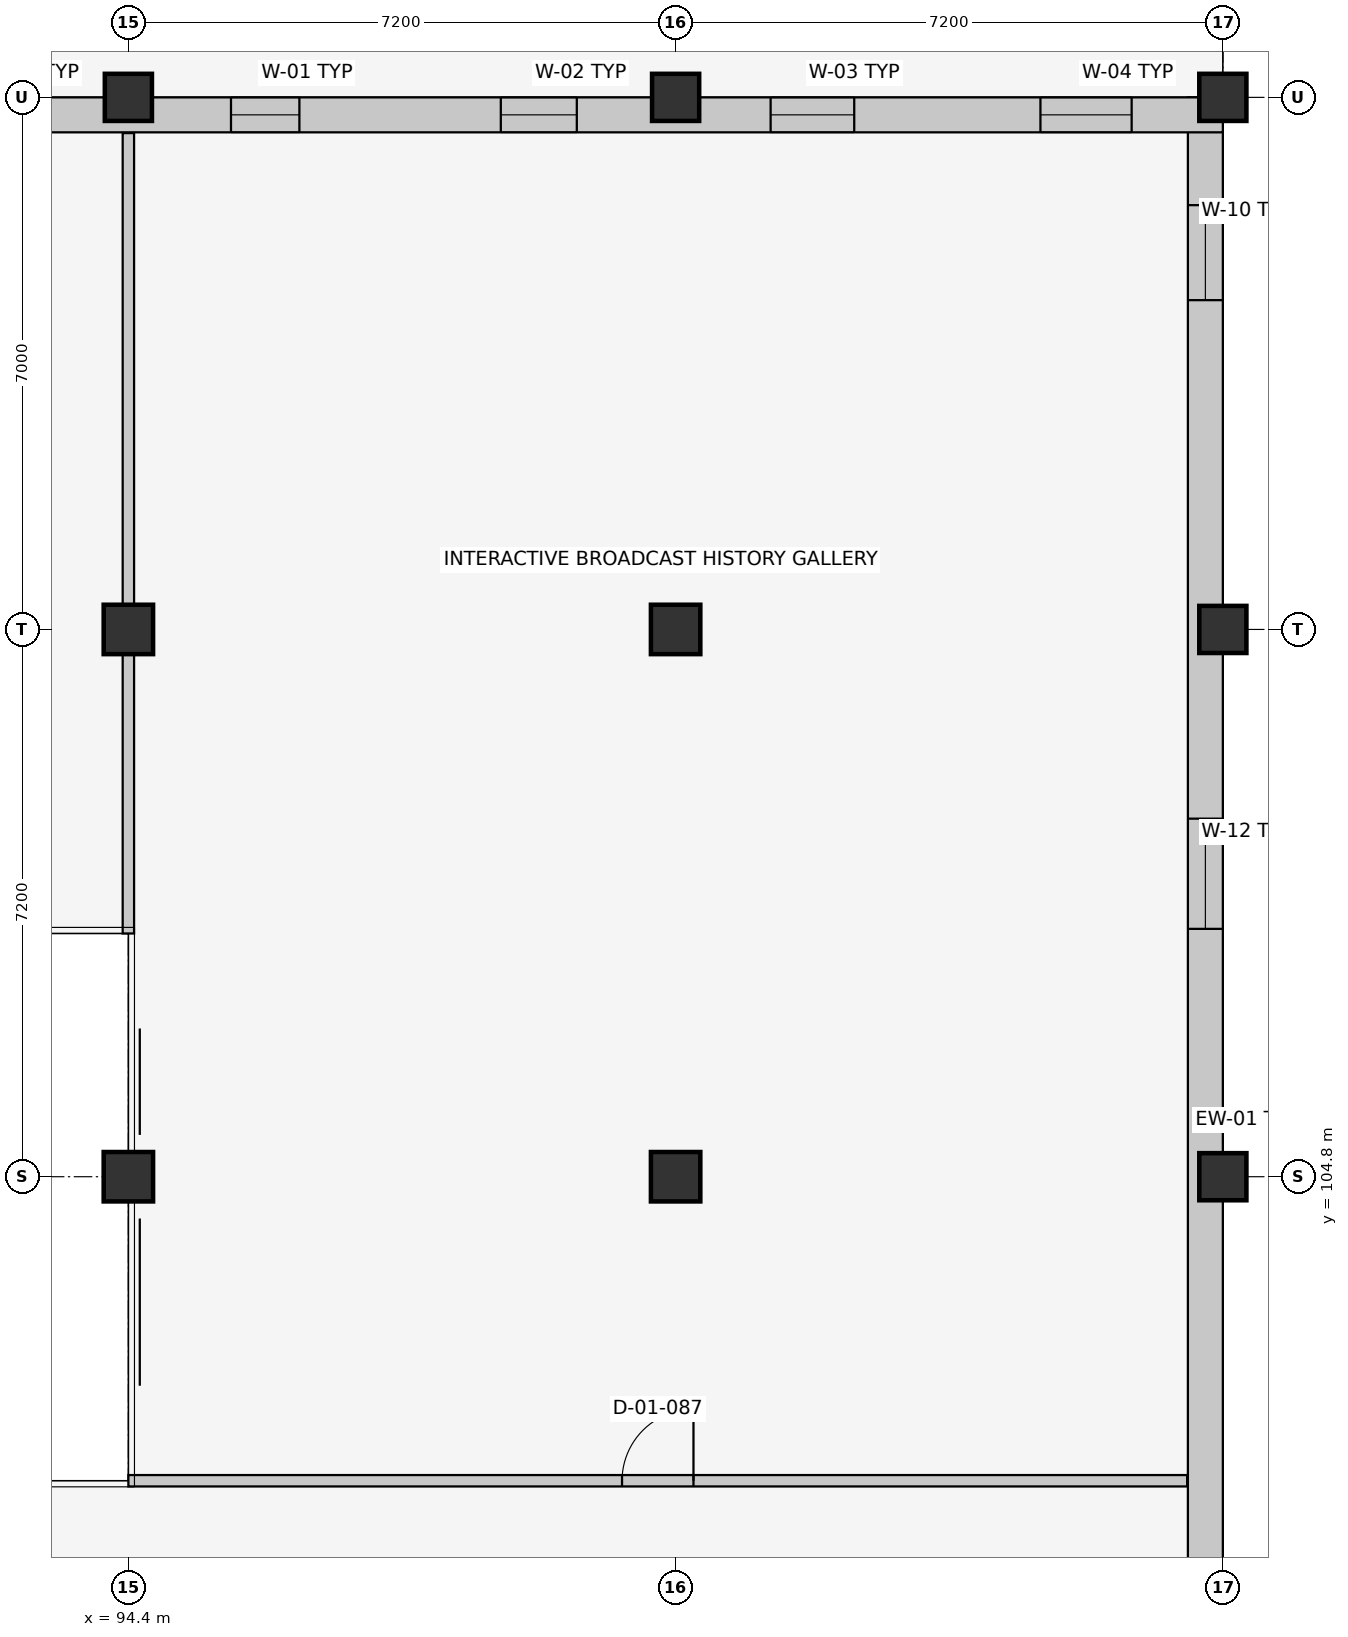
"""IFC4 building model, lengths in metres.
Left out: names, types, materials, properties, quantities, classifications, styles, units other than length and angle.
Written with IfcOpenShell. Run it as: python <this file> out.ifc"""

import sys

from ifc_helpers import new_model, si_unit, direction, frame, frame_2d, origin, origin_2d, place, context, subcontext, project, spatial, rectangle, extrude, element, fill, save


model = new_model("IFC4")
c1 = context("Model", 3, precision=1e-05, world=origin(), true_north=direction((0.0, 1.0)))
c2 = subcontext(c1, "Body", "Model", "MODEL_VIEW")
j1 = project(units=[si_unit("LENGTHUNIT", "METRE"), si_unit("PLANEANGLEUNIT", "RADIAN")], contexts=[c1])
p1 = place(None, origin())
s1 = spatial("IfcSite", under=j1, at=p1, CompositionType="ELEMENT")
p2 = place(p1, origin())
s2 = spatial("IfcBuilding", under=s1, at=p2, CompositionType="ELEMENT")
p3 = place(p2, frame((0.0, 0.0, 5.4)))
s3 = spatial("IfcBuildingStorey", under=s2, at=p3, CompositionType="ELEMENT", Elevation=5.4)
for number, where, z_axis, x_axis in (
    (1, (94.4, 104.8, 0.0), (0.0, 0.0, 1.0), (1.0, 0.0, 0.0)),
    (2, (94.4, 112.0, 0.0), (0.0, 0.0, 1.0), (1.0, 0.0, 0.0)),
):
    element("IfcColumn", number, at=place(p3, frame(where, z_axis=z_axis, x_axis=x_axis)), inside=s3, PredefinedType="COLUMN", context=c2, shape_type="SweptSolid", body=[
        extrude(rectangle(XDim=0.65, YDim=0.65, at=origin_2d()), origin(), (0.0, 0.0, 1.0), 4.2),
    ])
p4 = place(p3, frame((94.4, 119.0, 0.0), z_axis=(0.0, 0.0, 1.0), x_axis=(1.0, 0.0, 0.0)))
e3 = element("IfcColumn", 3, at=p4, inside=s3, PredefinedType="COLUMN", context=c2, shape_type="SweptSolid", body=[
    extrude(rectangle(XDim=0.62, YDim=0.62, at=origin_2d()), origin(), (0.0, 0.0, 1.0), 4.2),
])
for number, where, z_axis, x_axis in (
    (4, (101.6, 104.8, 0.0), (0.0, 0.0, 1.0), (1.0, 0.0, 0.0)),
    (5, (101.6, 112.0, 0.0), (0.0, 0.0, 1.0), (1.0, 0.0, 0.0)),
):
    element("IfcColumn", number, at=place(p3, frame(where, z_axis=z_axis, x_axis=x_axis)), inside=s3, PredefinedType="COLUMN", context=c2, shape_type="SweptSolid", body=[
        extrude(rectangle(XDim=0.65, YDim=0.65, at=origin_2d()), origin(), (0.0, 0.0, 1.0), 4.2),
    ])
for number, where, z_axis, x_axis in (
    (6, (101.6, 119.0, 0.0), (0.0, 0.0, 1.0), (1.0, 0.0, 0.0)),
    (7, (108.8, 104.8, 0.0), (0.0, 0.0, 1.0), (1.0, 0.0, 0.0)),
    (8, (108.8, 112.0, 0.0), (0.0, 0.0, 1.0), (1.0, 0.0, 0.0)),
    (9, (108.8, 119.0, 0.0), (0.0, 0.0, 1.0), (1.0, 0.0, 0.0)),
):
    element("IfcColumn", number, at=place(p3, frame(where, z_axis=z_axis, x_axis=x_axis)), inside=s3, PredefinedType="COLUMN", context=c2, shape_type="SweptSolid", body=[
        extrude(rectangle(XDim=0.62, YDim=0.62, at=origin_2d()), origin(), (0.0, 0.0, 1.0), 4.2),
    ])
p5 = place(p3, frame((108.57, 119.0, 0.0), z_axis=(0.0, 0.0, 1.0), x_axis=(0.0, -1.0, 0.0)))
e10 = element("IfcWall", 10, at=p5, inside=s3, PredefinedType="SOLIDWALL", context=c2, shape_type="SweptSolid", body=[
    extrude(rectangle(XDim=28.6, YDim=0.46, at=frame_2d((14.3, 0.0))), origin(), (0.0, 0.0, 1.0), 3.175),
])
p6 = place(p5, frame((1.418, 0.0, 0.9)))
e11 = element("IfcOpeningElement", 11, at=p6, cuts=e10, PredefinedType="OPENING", context=c2, shape_type="SweptSolid", body=[
    extrude(rectangle(XDim=1.25, YDim=1.45, at=frame_2d((0.625, 0.725))), frame((0.0, 0.242, 0.0), z_axis=(0.0, -1.0, 0.0), x_axis=(1.0, 0.0, 0.0)), (0.0, 0.0, 1.0), 0.484),
])
p7 = place(p5, frame((9.489, 0.0, 0.9)))
e12 = element("IfcOpeningElement", 12, at=p7, cuts=e10, PredefinedType="OPENING", context=c2, shape_type="SweptSolid", body=[
    extrude(rectangle(XDim=1.45, YDim=1.45, at=frame_2d((0.725, 0.725))), frame((0.0, 0.242, 0.0), z_axis=(0.0, -1.0, 0.0), x_axis=(1.0, 0.0, 0.0)), (0.0, 0.0, 1.0), 0.484),
])
p8 = place(p5, frame((25.932, 0.0, 0.9)))
e13 = element("IfcOpeningElement", 13, at=p8, cuts=e10, PredefinedType="OPENING", context=c2, shape_type="SweptSolid", body=[
    extrude(rectangle(XDim=1.25, YDim=1.6, at=frame_2d((0.625, 0.8))), frame((0.0, 0.242, 0.0), z_axis=(0.0, -1.0, 0.0), x_axis=(1.0, 0.0, 0.0)), (0.0, 0.0, 1.0), 0.484),
])
p9 = place(p3, frame((65.6, 118.77, 0.0), z_axis=(0.0, 0.0, 1.0), x_axis=(1.0, 0.0, 0.0)))
e14 = element("IfcWall", 14, at=p9, inside=s3, PredefinedType="SOLIDWALL", context=c2, shape_type="SweptSolid", body=[
    extrude(rectangle(XDim=43.2, YDim=0.46, at=frame_2d((21.6, 0.0))), origin(), (0.0, 0.0, 1.0), 3.215),
])
p10 = place(p9, frame((1.11, 0.0, 0.9)))
e15 = element("IfcOpeningElement", 15, at=p10, cuts=e14, PredefinedType="OPENING", context=c2, shape_type="SweptSolid", body=[
    extrude(rectangle(XDim=1.38, YDim=1.6, at=frame_2d((0.69, 0.8))), frame((0.0, 0.242, 0.0), z_axis=(0.0, -1.0, 0.0), x_axis=(1.0, 0.0, 0.0)), (0.0, 0.0, 1.0), 0.484),
])
p11 = place(p9, frame((4.65, 0.0, 0.9)))
e16 = element("IfcOpeningElement", 16, at=p11, cuts=e14, PredefinedType="OPENING", context=c2, shape_type="SweptSolid", body=[
    extrude(rectangle(XDim=1.5, YDim=1.6, at=frame_2d((0.75, 0.8))), frame((0.0, 0.242, 0.0), z_axis=(0.0, -1.0, 0.0), x_axis=(1.0, 0.0, 0.0)), (0.0, 0.0, 1.0), 0.484),
])
p12 = place(p9, frame((8.5, 0.0, 0.9)))
e17 = element("IfcOpeningElement", 17, at=p12, cuts=e14, PredefinedType="OPENING", context=c2, shape_type="SweptSolid", body=[
    extrude(rectangle(XDim=1.0, YDim=1.75, at=frame_2d((0.5, 0.875))), frame((0.0, 0.242, 0.0), z_axis=(0.0, -1.0, 0.0), x_axis=(1.0, 0.0, 0.0)), (0.0, 0.0, 1.0), 0.484),
])
p13 = place(p9, frame((12.04, 0.0, 0.9)))
e18 = element("IfcOpeningElement", 18, at=p13, cuts=e14, PredefinedType="OPENING", context=c2, shape_type="SweptSolid", body=[
    extrude(rectangle(XDim=1.12, YDim=1.75, at=frame_2d((0.56, 0.875))), frame((0.0, 0.242, 0.0), z_axis=(0.0, -1.0, 0.0), x_axis=(1.0, 0.0, 0.0)), (0.0, 0.0, 1.0), 0.484),
])
p14 = place(p9, frame((15.58, 0.0, 0.9)))
e19 = element("IfcOpeningElement", 19, at=p14, cuts=e14, PredefinedType="OPENING", context=c2, shape_type="SweptSolid", body=[
    extrude(rectangle(XDim=1.24, YDim=1.75, at=frame_2d((0.62, 0.875))), frame((0.0, 0.242, 0.0), z_axis=(0.0, -1.0, 0.0), x_axis=(1.0, 0.0, 0.0)), (0.0, 0.0, 1.0), 0.484),
])
p15 = place(p9, frame((19.13, 0.0, 0.9)))
e20 = element("IfcOpeningElement", 20, at=p15, cuts=e14, PredefinedType="OPENING", context=c2, shape_type="SweptSolid", body=[
    extrude(rectangle(XDim=1.34, YDim=1.75, at=frame_2d((0.67, 0.875))), frame((0.0, 0.242, 0.0), z_axis=(0.0, -1.0, 0.0), x_axis=(1.0, 0.0, 0.0)), (0.0, 0.0, 1.0), 0.484),
])
p16 = place(p9, frame((22.68, 0.0, 0.9)))
e21 = element("IfcOpeningElement", 21, at=p16, cuts=e14, PredefinedType="OPENING", context=c2, shape_type="SweptSolid", body=[
    extrude(rectangle(XDim=1.44, YDim=1.75, at=frame_2d((0.72, 0.875))), frame((0.0, 0.242, 0.0), z_axis=(0.0, -1.0, 0.0), x_axis=(1.0, 0.0, 0.0)), (0.0, 0.0, 1.0), 0.484),
])
p17 = place(p9, frame((26.25, 0.0, 0.9)))
e22 = element("IfcOpeningElement", 22, at=p17, cuts=e14, PredefinedType="OPENING", context=c2, shape_type="SweptSolid", body=[
    extrude(rectangle(XDim=1.5, YDim=1.75, at=frame_2d((0.75, 0.875))), frame((0.0, 0.242, 0.0), z_axis=(0.0, -1.0, 0.0), x_axis=(1.0, 0.0, 0.0)), (0.0, 0.0, 1.0), 0.484),
])
p18 = place(p9, frame((30.15, 0.0, 0.9)))
e23 = element("IfcOpeningElement", 23, at=p18, cuts=e14, PredefinedType="OPENING", context=c2, shape_type="SweptSolid", body=[
    extrude(rectangle(XDim=0.9, YDim=1.35, at=frame_2d((0.45, 0.675))), frame((0.0, 0.242, 0.0), z_axis=(0.0, -1.0, 0.0), x_axis=(1.0, 0.0, 0.0)), (0.0, 0.0, 1.0), 0.484),
])
p19 = place(p9, frame((33.7, 0.0, 0.9)))
e24 = element("IfcOpeningElement", 24, at=p19, cuts=e14, PredefinedType="OPENING", context=c2, shape_type="SweptSolid", body=[
    extrude(rectangle(XDim=1.0, YDim=1.35, at=frame_2d((0.5, 0.675))), frame((0.0, 0.242, 0.0), z_axis=(0.0, -1.0, 0.0), x_axis=(1.0, 0.0, 0.0)), (0.0, 0.0, 1.0), 0.484),
])
p20 = place(p9, frame((37.25, 0.0, 0.9)))
e25 = element("IfcOpeningElement", 25, at=p20, cuts=e14, PredefinedType="OPENING", context=c2, shape_type="SweptSolid", body=[
    extrude(rectangle(XDim=1.1, YDim=1.35, at=frame_2d((0.55, 0.675))), frame((0.0, 0.242, 0.0), z_axis=(0.0, -1.0, 0.0), x_axis=(1.0, 0.0, 0.0)), (0.0, 0.0, 1.0), 0.484),
])
p21 = place(p9, frame((40.8, 0.0, 0.9)))
e26 = element("IfcOpeningElement", 26, at=p21, cuts=e14, PredefinedType="OPENING", context=c2, shape_type="SweptSolid", body=[
    extrude(rectangle(XDim=1.2, YDim=1.35, at=frame_2d((0.6, 0.675))), frame((0.0, 0.242, 0.0), z_axis=(0.0, -1.0, 0.0), x_axis=(1.0, 0.0, 0.0)), (0.0, 0.0, 1.0), 0.484),
])
p22 = place(p3, frame((94.4, 108.0, 0.0), z_axis=(0.0, 0.0, 1.0), x_axis=(0.0, 1.0, 0.0)))
e27 = element("IfcWall", 27, at=p22, inside=s3, PredefinedType="PARTITIONING", context=c2, shape_type="SweptSolid", body=[
    extrude(rectangle(XDim=10.53, YDim=0.15, at=frame_2d((5.265, 0.0))), origin(), (0.0, 0.0, 1.0), 3.295),
])
p23 = place(p3, frame((94.4, 100.8, 0.0), z_axis=(0.0, 0.0, 1.0), x_axis=(1.0, 0.0, 0.0)))
e28 = element("IfcWall", 28, at=p23, inside=s3, PredefinedType="PARTITIONING", context=c2, shape_type="SweptSolid", body=[
    extrude(rectangle(XDim=13.93, YDim=0.15, at=frame_2d((6.965, 0.0))), origin(), (0.0, 0.0, 1.0), 3.92),
])
p24 = place(p23, frame((6.495, 0.0, 0.0)))
e29 = element("IfcOpeningElement", 29, at=p24, cuts=e28, PredefinedType="OPENING", context=c2, shape_type="SweptSolid", body=[
    extrude(rectangle(XDim=0.94, YDim=2.1, at=frame_2d((0.47, 1.05))), frame((0.0, 0.087, 0.0), z_axis=(0.0, -1.0, 0.0), x_axis=(1.0, 0.0, 0.0)), (0.0, 0.0, 1.0), 0.174),
])
p25 = place(p6, origin())
e30 = element("IfcWindow", 30, at=p25, inside=s3, PartitioningType="SINGLE_PANEL", PredefinedType="WINDOW", context=c2, shape_type="SweptSolid", body=[
    extrude(rectangle(XDim=1.25, YDim=1.45, at=frame_2d((0.625, 0.725))), frame((0.0, 0.03, 0.0), z_axis=(0.0, -1.0, 0.0), x_axis=(1.0, 0.0, 0.0)), (0.0, 0.0, 1.0), 0.06),
])
fill(e11, e30)
p26 = place(p7, origin())
e31 = element("IfcWindow", 31, at=p26, inside=s3, PartitioningType="SINGLE_PANEL", PredefinedType="WINDOW", context=c2, shape_type="SweptSolid", body=[
    extrude(rectangle(XDim=1.45, YDim=1.45, at=frame_2d((0.725, 0.725))), frame((0.0, 0.03, 0.0), z_axis=(0.0, -1.0, 0.0), x_axis=(1.0, 0.0, 0.0)), (0.0, 0.0, 1.0), 0.06),
])
fill(e12, e31)
p27 = place(p18, origin())
e32 = element("IfcWindow", 32, at=p27, inside=s3, PartitioningType="SINGLE_PANEL", PredefinedType="WINDOW", context=c2, shape_type="SweptSolid", body=[
    extrude(rectangle(XDim=0.9, YDim=1.35, at=frame_2d((0.45, 0.675))), frame((0.0, 0.03, 0.0), z_axis=(0.0, -1.0, 0.0), x_axis=(1.0, 0.0, 0.0)), (0.0, 0.0, 1.0), 0.06),
])
fill(e23, e32)
p28 = place(p19, origin())
e33 = element("IfcWindow", 33, at=p28, inside=s3, PartitioningType="SINGLE_PANEL", PredefinedType="WINDOW", context=c2, shape_type="SweptSolid", body=[
    extrude(rectangle(XDim=1.0, YDim=1.35, at=frame_2d((0.5, 0.675))), frame((0.0, 0.03, 0.0), z_axis=(0.0, -1.0, 0.0), x_axis=(1.0, 0.0, 0.0)), (0.0, 0.0, 1.0), 0.06),
])
fill(e24, e33)
p29 = place(p20, origin())
e34 = element("IfcWindow", 34, at=p29, inside=s3, PartitioningType="SINGLE_PANEL", PredefinedType="WINDOW", context=c2, shape_type="SweptSolid", body=[
    extrude(rectangle(XDim=1.1, YDim=1.35, at=frame_2d((0.55, 0.675))), frame((0.0, 0.03, 0.0), z_axis=(0.0, -1.0, 0.0), x_axis=(1.0, 0.0, 0.0)), (0.0, 0.0, 1.0), 0.06),
])
fill(e25, e34)
p30 = place(p21, origin())
e35 = element("IfcWindow", 35, at=p30, inside=s3, PartitioningType="SINGLE_PANEL", PredefinedType="WINDOW", context=c2, shape_type="SweptSolid", body=[
    extrude(rectangle(XDim=1.2, YDim=1.35, at=frame_2d((0.6, 0.675))), frame((0.0, 0.03, 0.0), z_axis=(0.0, -1.0, 0.0), x_axis=(1.0, 0.0, 0.0)), (0.0, 0.0, 1.0), 0.06),
])
fill(e26, e35)
p31 = place(p24, origin())
e36 = element("IfcDoor", 36, at=p31, inside=s3, OperationType="SINGLE_SWING_RIGHT", PredefinedType="DOOR", context=c2, shape_type="SweptSolid", body=[
    extrude(rectangle(XDim=0.94, YDim=2.1, at=frame_2d((0.47, 1.05))), frame((0.0, 0.025, 0.0), z_axis=(0.0, -1.0, 0.0), x_axis=(1.0, 0.0, 0.0)), (0.0, 0.0, 1.0), 0.05),
])
fill(e29, e36)
save(model, sys.argv[1])
